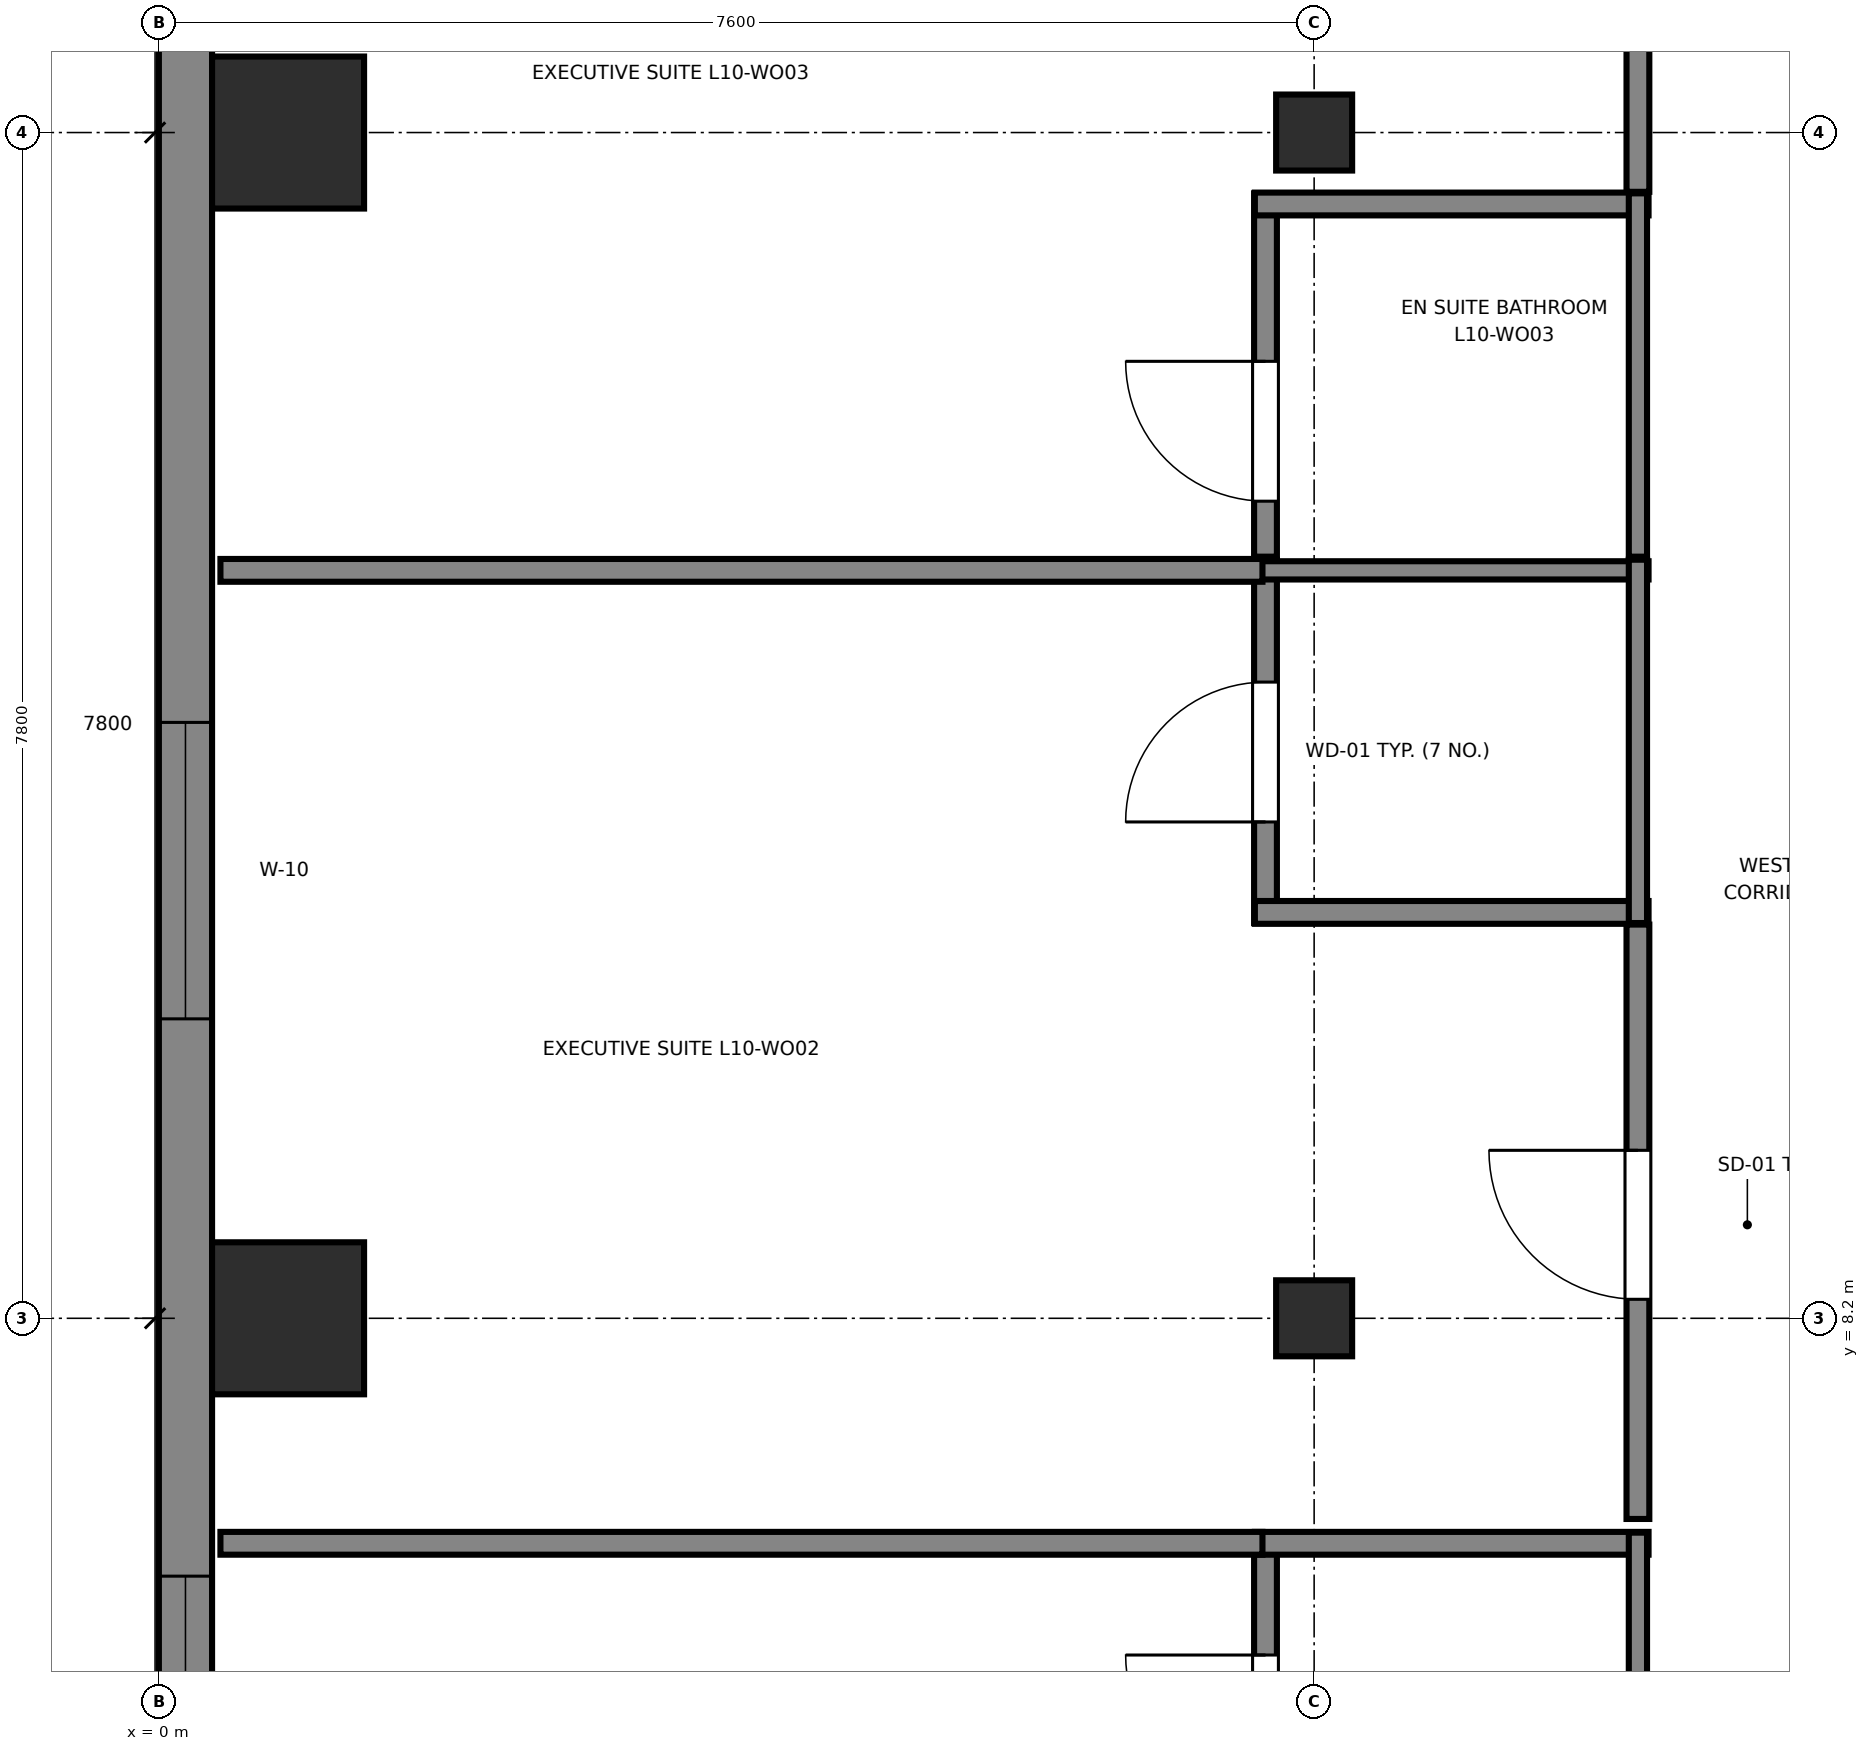
"""IFC4 building model, lengths in metres.
Left out: names, types, materials, properties, quantities, classifications, styles, units other than length and angle.
Written with IfcOpenShell. Run it as: python <this file> out.ifc"""

import sys

from ifc_helpers import new_model, si_unit, direction, frame, frame_2d, origin, origin_2d, place, context, subcontext, project, spatial, rectangle, i_section, extrude, source, transform, mapped, element, fill, save


model = new_model("IFC4")
c1 = context("Model", 3, precision=1e-05, world=origin(), true_north=direction((0.0, 1.0)))
c2 = subcontext(c1, "Body", "Model", "MODEL_VIEW")
j1 = project(units=[si_unit("LENGTHUNIT", "METRE"), si_unit("PLANEANGLEUNIT", "RADIAN")], contexts=[c1])
p1 = place(None, origin())
s1 = spatial("IfcSite", under=j1, at=p1, CompositionType="ELEMENT")
p2 = place(p1, origin())
s2 = spatial("IfcBuilding", under=s1, at=p2, CompositionType="ELEMENT")
p3 = place(p2, frame((0.0, 0.0, 46.2)))
s3 = spatial("IfcBuildingStorey", under=s2, at=p3, CompositionType="ELEMENT", Elevation=46.2)
m1 = source(origin(), c2, "Body", "SweptSolid", [
    extrude(rectangle(XDim=1.0, YDim=1.0, at=origin_2d()), origin(), (0.0, 0.0, 1.0), 3.55),
])
for number, where, z_axis, x_axis in (
    (1, (0.85, 8.2, 0.0), (0.0, 0.0, 1.0), (1.0, 0.0, 0.0)),
    (2, (0.85, 16.0, 0.0), (0.0, 0.0, 1.0), (1.0, 0.0, 0.0)),
):
    element("IfcColumn", number, at=place(p3, frame(where, z_axis=z_axis, x_axis=x_axis)), inside=s3, PredefinedType="COLUMN", context=c2, shape_type="MappedRepresentation", body=[
        mapped(m1, transform((0.0, 0.0, 0.0), x_axis=(1.0, 0.0, 0.0), y_axis=(0.0, 1.0, 0.0), z_axis=(0.0, 0.0, 1.0), scale=1.0)),
    ])
m2 = source(origin(), c2, "Body", "SweptSolid", [
    extrude(i_section(OverallWidth=0.5, OverallDepth=0.5, WebThickness=0.028, FlangeThickness=0.045, at=origin_2d()), origin(), (0.0, 0.0, 1.0), 3.55),
])
for number, where, z_axis, x_axis in (
    (3, (7.6, 8.2, 0.0), (0.0, 0.0, 1.0), (1.0, 0.0, 0.0)),
    (4, (7.6, 16.0, 0.0), (0.0, 0.0, 1.0), (1.0, 0.0, 0.0)),
):
    element("IfcColumn", number, at=place(p3, frame(where, z_axis=z_axis, x_axis=x_axis)), inside=s3, PredefinedType="COLUMN", context=c2, shape_type="MappedRepresentation", body=[
        mapped(m2, transform((0.0, 0.0, 0.0), x_axis=(1.0, 0.0, 0.0), y_axis=(0.0, 1.0, 0.0), z_axis=(0.0, 0.0, 1.0), scale=1.0)),
    ])
p4 = place(p3, frame((0.175, 41.383, 0.0), z_axis=(0.0, 0.0, 1.0), x_axis=(0.0, -1.0, 0.0)))
e5 = element("IfcWall", 5, at=p4, inside=s3, PredefinedType="SOLIDWALL", context=c2, shape_type="SweptSolid", body=[
    extrude(rectangle(XDim=36.766, YDim=0.35, at=frame_2d((18.383, 0.0))), origin(), (0.0, 0.0, 1.0), 3.37),
])
p5 = place(p4, frame((1.601, 0.0, 0.68)))
e6 = element("IfcOpeningElement", 6, at=p5, cuts=e5, PredefinedType="OPENING", context=c2, shape_type="SweptSolid", body=[
    extrude(rectangle(XDim=1.95, YDim=1.82, at=frame_2d((0.975, 0.91))), frame((0.0, 0.185, 0.0), z_axis=(0.0, -1.0, 0.0), x_axis=(1.0, 0.0, 0.0)), (0.0, 0.0, 1.0), 0.37),
])
p6 = place(p4, frame((4.503, 0.0, 0.68)))
e7 = element("IfcOpeningElement", 7, at=p6, cuts=e5, PredefinedType="OPENING", context=c2, shape_type="SweptSolid", body=[
    extrude(rectangle(XDim=1.95, YDim=1.82, at=frame_2d((0.975, 0.91))), frame((0.0, 0.185, 0.0), z_axis=(0.0, -1.0, 0.0), x_axis=(1.0, 0.0, 0.0)), (0.0, 0.0, 1.0), 0.37),
])
p7 = place(p4, frame((9.504, 0.0, 0.68)))
e8 = element("IfcOpeningElement", 8, at=p7, cuts=e5, PredefinedType="OPENING", context=c2, shape_type="SweptSolid", body=[
    extrude(rectangle(XDim=1.95, YDim=1.82, at=frame_2d((0.975, 0.91))), frame((0.0, 0.185, 0.0), z_axis=(0.0, -1.0, 0.0), x_axis=(1.0, 0.0, 0.0)), (0.0, 0.0, 1.0), 0.37),
])
p8 = place(p4, frame((22.41, 0.0, 0.68)))
e9 = element("IfcOpeningElement", 9, at=p8, cuts=e5, PredefinedType="OPENING", context=c2, shape_type="SweptSolid", body=[
    extrude(rectangle(XDim=1.95, YDim=1.82, at=frame_2d((0.975, 0.91))), frame((0.0, 0.185, 0.0), z_axis=(0.0, -1.0, 0.0), x_axis=(1.0, 0.0, 0.0)), (0.0, 0.0, 1.0), 0.37),
])
p9 = place(p4, frame((29.263, 0.0, 0.68)))
e10 = element("IfcOpeningElement", 10, at=p9, cuts=e5, PredefinedType="OPENING", context=c2, shape_type="SweptSolid", body=[
    extrude(rectangle(XDim=1.95, YDim=1.82, at=frame_2d((0.975, 0.91))), frame((0.0, 0.185, 0.0), z_axis=(0.0, -1.0, 0.0), x_axis=(1.0, 0.0, 0.0)), (0.0, 0.0, 1.0), 0.37),
])
p10 = place(p4, frame((34.879, 0.0, 0.62)))
e11 = element("IfcOpeningElement", 11, at=p10, cuts=e5, PredefinedType="OPENING", context=c2, shape_type="SweptSolid", body=[
    extrude(rectangle(XDim=1.5, YDim=1.55, at=frame_2d((0.75, 0.775))), frame((0.0, 0.185, 0.0), z_axis=(0.0, -1.0, 0.0), x_axis=(1.0, 0.0, 0.0)), (0.0, 0.0, 1.0), 0.37),
])
p11 = place(p4, frame((17.704, 0.0, 0.62)))
e12 = element("IfcOpeningElement", 12, at=p11, cuts=e5, PredefinedType="OPENING", context=c2, shape_type="SweptSolid", body=[
    extrude(rectangle(XDim=1.5, YDim=1.55, at=frame_2d((0.75, 0.775))), frame((0.0, 0.185, 0.0), z_axis=(0.0, -1.0, 0.0), x_axis=(1.0, 0.0, 0.0)), (0.0, 0.0, 1.0), 0.37),
])
p12 = place(p3, frame((7.28, 4.4, 0.0), z_axis=(0.0, 0.0, 1.0), x_axis=(0.0, 1.0, 0.0)))
e13 = element("IfcWall", 13, at=p12, inside=s3, PredefinedType="PARTITIONING", context=c2, shape_type="SweptSolid", body=[
    extrude(rectangle(XDim=2.39, YDim=0.15, at=frame_2d((1.195, 0.0))), origin(), (0.0, 0.0, 1.0), 3.37),
])
p13 = place(p12, frame((0.665, 0.0, 0.0)))
e14 = element("IfcOpeningElement", 14, at=p13, cuts=e13, PredefinedType="OPENING", context=c2, shape_type="SweptSolid", body=[
    extrude(rectangle(XDim=0.92, YDim=2.01, at=frame_2d((0.46, 1.005))), frame((0.0, 0.085, 0.0), z_axis=(0.0, -1.0, 0.0), x_axis=(1.0, 0.0, 0.0)), (0.0, 0.0, 1.0), 0.17),
])
p14 = place(p3, frame((7.21, 6.72, 0.0), z_axis=(0.0, 0.0, 1.0), x_axis=(1.0, 0.0, 0.0)))
e15 = element("IfcWall", 15, at=p14, inside=s3, PredefinedType="PARTITIONING", context=c2, shape_type="SweptSolid", body=[
    extrude(rectangle(XDim=2.59, YDim=0.15, at=frame_2d((1.295, 0.0))), origin(), (0.0, 0.0, 1.0), 3.37),
])
p15 = place(p3, frame((9.73, 4.4, 0.0), z_axis=(0.0, 0.0, 1.0), x_axis=(0.0, 1.0, 0.0)))
e16 = element("IfcWall", 16, at=p15, inside=s3, PredefinedType="PLUMBINGWALL", context=c2, shape_type="SweptSolid", body=[
    extrude(rectangle(XDim=2.39, YDim=0.12, at=frame_2d((1.195, 0.0))), origin(), (0.0, 0.0, 1.0), 3.37),
])
p16 = place(p3, frame((7.28, 10.8, 0.0), z_axis=(0.0, 0.0, 1.0), x_axis=(0.0, 1.0, 0.0)))
e17 = element("IfcWall", 17, at=p16, inside=s3, PredefinedType="PARTITIONING", context=c2, shape_type="SweptSolid", body=[
    extrude(rectangle(XDim=2.39, YDim=0.15, at=frame_2d((1.195, 0.0))), origin(), (0.0, 0.0, 1.0), 3.37),
])
p17 = place(p16, frame((0.665, 0.0, 0.0)))
e18 = element("IfcOpeningElement", 18, at=p17, cuts=e17, PredefinedType="OPENING", context=c2, shape_type="SweptSolid", body=[
    extrude(rectangle(XDim=0.92, YDim=2.01, at=frame_2d((0.46, 1.005))), frame((0.0, 0.085, 0.0), z_axis=(0.0, -1.0, 0.0), x_axis=(1.0, 0.0, 0.0)), (0.0, 0.0, 1.0), 0.17),
])
p18 = place(p3, frame((7.21, 10.87, 0.0), z_axis=(0.0, 0.0, 1.0), x_axis=(1.0, 0.0, 0.0)))
e19 = element("IfcWall", 19, at=p18, inside=s3, PredefinedType="PARTITIONING", context=c2, shape_type="SweptSolid", body=[
    extrude(rectangle(XDim=2.59, YDim=0.15, at=frame_2d((1.295, 0.0))), origin(), (0.0, 0.0, 1.0), 3.37),
])
p19 = place(p3, frame((7.21, 13.12, 0.0), z_axis=(0.0, 0.0, 1.0), x_axis=(1.0, 0.0, 0.0)))
e20 = element("IfcWall", 20, at=p19, inside=s3, PredefinedType="PLUMBINGWALL", context=c2, shape_type="SweptSolid", body=[
    extrude(rectangle(XDim=2.59, YDim=0.12, at=frame_2d((1.295, 0.0))), origin(), (0.0, 0.0, 1.0), 3.37),
])
p20 = place(p3, frame((9.73, 10.8, 0.0), z_axis=(0.0, 0.0, 1.0), x_axis=(0.0, 1.0, 0.0)))
e21 = element("IfcWall", 21, at=p20, inside=s3, PredefinedType="PLUMBINGWALL", context=c2, shape_type="SweptSolid", body=[
    extrude(rectangle(XDim=2.39, YDim=0.12, at=frame_2d((1.195, 0.0))), origin(), (0.0, 0.0, 1.0), 3.37),
])
p21 = place(p3, frame((7.28, 13.21, 0.0), z_axis=(0.0, 0.0, 1.0), x_axis=(0.0, 1.0, 0.0)))
e22 = element("IfcWall", 22, at=p21, inside=s3, PredefinedType="PARTITIONING", context=c2, shape_type="SweptSolid", body=[
    extrude(rectangle(XDim=2.39, YDim=0.15, at=frame_2d((1.195, 0.0))), origin(), (0.0, 0.0, 1.0), 3.37),
])
p22 = place(p21, frame((0.365, 0.0, 0.0)))
e23 = element("IfcOpeningElement", 23, at=p22, cuts=e22, PredefinedType="OPENING", context=c2, shape_type="SweptSolid", body=[
    extrude(rectangle(XDim=0.92, YDim=2.01, at=frame_2d((0.46, 1.005))), frame((0.0, 0.085, 0.0), z_axis=(0.0, -1.0, 0.0), x_axis=(1.0, 0.0, 0.0)), (0.0, 0.0, 1.0), 0.17),
])
p23 = place(p3, frame((7.21, 15.53, 0.0), z_axis=(0.0, 0.0, 1.0), x_axis=(1.0, 0.0, 0.0)))
e24 = element("IfcWall", 24, at=p23, inside=s3, PredefinedType="PARTITIONING", context=c2, shape_type="SweptSolid", body=[
    extrude(rectangle(XDim=2.59, YDim=0.15, at=frame_2d((1.295, 0.0))), origin(), (0.0, 0.0, 1.0), 3.37),
])
p24 = place(p3, frame((9.73, 13.21, 0.0), z_axis=(0.0, 0.0, 1.0), x_axis=(0.0, 1.0, 0.0)))
e25 = element("IfcWall", 25, at=p24, inside=s3, PredefinedType="PLUMBINGWALL", context=c2, shape_type="SweptSolid", body=[
    extrude(rectangle(XDim=2.39, YDim=0.12, at=frame_2d((1.195, 0.0))), origin(), (0.0, 0.0, 1.0), 3.37),
])
p25 = place(p3, frame((0.405, 6.72, 0.0), z_axis=(0.0, 0.0, 1.0), x_axis=(1.0, 0.0, 0.0)))
e26 = element("IfcWall", 26, at=p25, inside=s3, PredefinedType="PARTITIONING", context=c2, shape_type="SweptSolid", body=[
    extrude(rectangle(XDim=6.855, YDim=0.15, at=frame_2d((3.427, 0.0))), origin(), (0.0, 0.0, 1.0), 3.37),
])
p26 = place(p3, frame((9.73, 6.88, 0.0), z_axis=(0.0, 0.0, 1.0), x_axis=(0.0, 1.0, 0.0)))
e27 = element("IfcWall", 27, at=p26, inside=s3, PredefinedType="PARTITIONING", context=c2, shape_type="SweptSolid", body=[
    extrude(rectangle(XDim=3.91, YDim=0.15, at=frame_2d((1.955, 0.0))), origin(), (0.0, 0.0, 1.0), 3.37),
])
p27 = place(p26, frame((1.445, 0.0, 0.0)))
e28 = element("IfcOpeningElement", 28, at=p27, cuts=e27, PredefinedType="OPENING", context=c2, shape_type="SweptSolid", body=[
    extrude(rectangle(XDim=0.98, YDim=2.12, at=frame_2d((0.49, 1.06))), frame((0.0, 0.085, 0.0), z_axis=(0.0, -1.0, 0.0), x_axis=(1.0, 0.0, 0.0)), (0.0, 0.0, 1.0), 0.17),
])
p28 = place(p3, frame((0.405, 13.12, 0.0), z_axis=(0.0, 0.0, 1.0), x_axis=(1.0, 0.0, 0.0)))
e29 = element("IfcWall", 29, at=p28, inside=s3, PredefinedType="PARTITIONING", context=c2, shape_type="SweptSolid", body=[
    extrude(rectangle(XDim=6.855, YDim=0.15, at=frame_2d((3.427, 0.0))), origin(), (0.0, 0.0, 1.0), 3.37),
])
p29 = place(p3, frame((9.73, 15.61, 0.0), z_axis=(0.0, 0.0, 1.0), x_axis=(0.0, 1.0, 0.0)))
e30 = element("IfcWall", 30, at=p29, inside=s3, PredefinedType="PARTITIONING", context=c2, shape_type="SweptSolid", body=[
    extrude(rectangle(XDim=3.81, YDim=0.15, at=frame_2d((1.905, 0.0))), origin(), (0.0, 0.0, 1.0), 3.37),
])
p30 = place(p29, frame((1.395, 0.0, 0.0)))
e31 = element("IfcOpeningElement", 31, at=p30, cuts=e30, PredefinedType="OPENING", context=c2, shape_type="SweptSolid", body=[
    extrude(rectangle(XDim=0.98, YDim=2.12, at=frame_2d((0.49, 1.06))), frame((0.0, 0.085, 0.0), z_axis=(0.0, -1.0, 0.0), x_axis=(1.0, 0.0, 0.0)), (0.0, 0.0, 1.0), 0.17),
])
m3 = source(origin(), c2, "Body", "SweptSolid", [
    extrude(rectangle(XDim=1.95, YDim=1.82, at=frame_2d((0.975, 0.91))), frame((0.0, 0.09, 0.0), z_axis=(0.0, -1.0, 0.0), x_axis=(1.0, 0.0, 0.0)), (0.0, 0.0, 1.0), 0.06),
])
p31 = place(p9, origin())
e32 = element("IfcWindow", 32, at=p31, inside=s3, PartitioningType="DOUBLE_PANEL_VERTICAL", PredefinedType="WINDOW", context=c2, shape_type="MappedRepresentation", body=[
    mapped(m3, transform((0.0, 0.0, 0.0), x_axis=(1.0, 0.0, 0.0), y_axis=(0.0, 1.0, 0.0), z_axis=(0.0, 0.0, 1.0), scale=1.0)),
])
fill(e10, e32)
m4 = source(origin(), c2, "Body", "SweptSolid", [
    extrude(rectangle(XDim=1.5, YDim=1.55, at=frame_2d((0.75, 0.775))), frame((0.0, 0.09, 0.0), z_axis=(0.0, -1.0, 0.0), x_axis=(1.0, 0.0, 0.0)), (0.0, 0.0, 1.0), 0.06),
])
p32 = place(p10, origin())
e33 = element("IfcWindow", 33, at=p32, inside=s3, PartitioningType="SINGLE_PANEL", PredefinedType="WINDOW", context=c2, shape_type="MappedRepresentation", body=[
    mapped(m4, transform((0.0, 0.0, 0.0), x_axis=(1.0, 0.0, 0.0), y_axis=(0.0, 1.0, 0.0), z_axis=(0.0, 0.0, 1.0), scale=1.0)),
])
fill(e11, e33)
m5 = source(origin(), c2, "Body", "SweptSolid", [
    extrude(rectangle(XDim=0.92, YDim=2.01, at=frame_2d((0.46, 1.005))), frame((0.0, 0.025, 0.0), z_axis=(0.0, -1.0, 0.0), x_axis=(1.0, 0.0, 0.0)), (0.0, 0.0, 1.0), 0.05),
])
p33 = place(p13, origin())
e34 = element("IfcDoor", 34, at=p33, inside=s3, OperationType="SINGLE_SWING_RIGHT", PredefinedType="DOOR", context=c2, shape_type="MappedRepresentation", body=[
    mapped(m5, transform((0.0, 0.0, 0.0), x_axis=(1.0, 0.0, 0.0), y_axis=(0.0, 1.0, 0.0), z_axis=(0.0, 0.0, 1.0), scale=1.0)),
])
fill(e14, e34)
p34 = place(p17, origin())
e35 = element("IfcDoor", 35, at=p34, inside=s3, OperationType="SINGLE_SWING_LEFT", PredefinedType="DOOR", context=c2, shape_type="MappedRepresentation", body=[
    mapped(m5, transform((0.0, 0.0, 0.0), x_axis=(1.0, 0.0, 0.0), y_axis=(0.0, 1.0, 0.0), z_axis=(0.0, 0.0, 1.0), scale=1.0)),
])
fill(e18, e35)
p35 = place(p22, origin())
e36 = element("IfcDoor", 36, at=p35, inside=s3, OperationType="SINGLE_SWING_RIGHT", PredefinedType="DOOR", context=c2, shape_type="MappedRepresentation", body=[
    mapped(m5, transform((0.0, 0.0, 0.0), x_axis=(1.0, 0.0, 0.0), y_axis=(0.0, 1.0, 0.0), z_axis=(0.0, 0.0, 1.0), scale=1.0)),
])
fill(e23, e36)
m6 = source(origin(), c2, "Body", "SweptSolid", [
    extrude(rectangle(XDim=0.98, YDim=2.12, at=frame_2d((0.49, 1.06))), frame((0.0, 0.025, 0.0), z_axis=(0.0, -1.0, 0.0), x_axis=(1.0, 0.0, 0.0)), (0.0, 0.0, 1.0), 0.05),
])
p36 = place(p27, origin())
e37 = element("IfcDoor", 37, at=p36, inside=s3, OperationType="SINGLE_SWING_RIGHT", PredefinedType="DOOR", context=c2, shape_type="MappedRepresentation", body=[
    mapped(m6, transform((0.0, 0.0, 0.0), x_axis=(1.0, 0.0, 0.0), y_axis=(0.0, 1.0, 0.0), z_axis=(0.0, 0.0, 1.0), scale=1.0)),
])
fill(e28, e37)
save(model, sys.argv[1])
